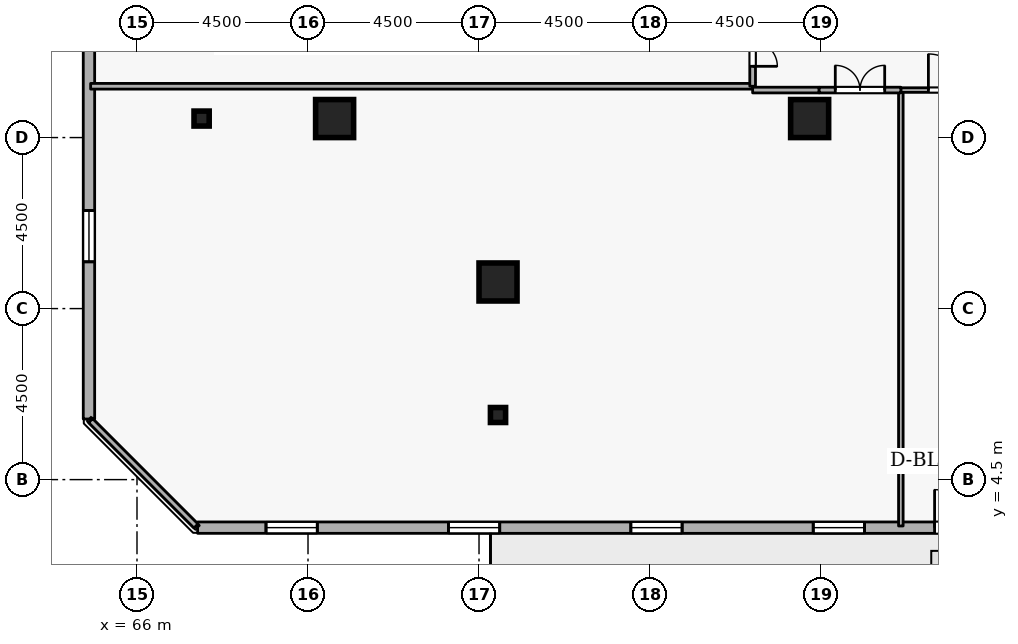
"""IFC4 building model, lengths in metres.
Left out: names, types, materials, properties, quantities, classifications, styles, units other than length and angle.
Written with IfcOpenShell. Run it as: python <this file> out.ifc"""

import sys

from ifc_helpers import new_model, si_unit, direction, frame, frame_2d, origin, origin_2d, place, context, subcontext, project, spatial, rectangle, i_section, extrude, element, fill, save


model = new_model("IFC4")
c1 = context("Model", 3, precision=1e-05, world=origin(), true_north=direction((0.0, 1.0)))
c2 = subcontext(c1, "Body", "Model", "MODEL_VIEW")
j1 = project(units=[si_unit("LENGTHUNIT", "METRE"), si_unit("PLANEANGLEUNIT", "RADIAN")], contexts=[c1])
p1 = place(None, origin())
s1 = spatial("IfcSite", under=j1, at=p1, CompositionType="ELEMENT")
p2 = place(p1, origin())
s2 = spatial("IfcBuilding", under=s1, at=p2, CompositionType="ELEMENT")
p3 = place(p2, frame((0.0, 0.0, 218.1)))
s3 = spatial("IfcBuildingStorey", under=s2, at=p3, CompositionType="ELEMENT", Elevation=218.1)
for number, where, z_axis, x_axis in (
    (1, (71.2, 14.0, 0.0), (0.0, 0.0, 1.0), (1.0, 0.0, 0.0)),
    (2, (75.5, 9.7, 0.0), (0.0, 0.0, 1.0), (1.0, 0.0, 0.0)),
    (3, (83.7, 14.0, 0.0), (0.0, 0.0, 1.0), (1.0, 0.0, 0.0)),
):
    element("IfcColumn", number, at=place(p3, frame(where, z_axis=z_axis, x_axis=x_axis)), inside=s3, PredefinedType="COLUMN", context=c2, shape_type="SweptSolid", body=[
        extrude(rectangle(XDim=1.0, YDim=1.0, at=origin_2d()), origin(), (0.0, 0.0, 1.0), 3.6),
    ])
for number, where, z_axis, x_axis in (
    (4, (67.7, 14.0, 0.0), (0.0, 0.0, 1.0), (1.0, 0.0, 0.0)),
    (5, (75.5, 6.2, 0.0), (0.0, 0.0, 1.0), (1.0, 0.0, 0.0)),
):
    element("IfcColumn", number, at=place(p3, frame(where, z_axis=z_axis, x_axis=x_axis)), inside=s3, PredefinedType="COLUMN", context=c2, shape_type="SweptSolid", body=[
        extrude(i_section(OverallWidth=0.399, OverallDepth=0.394, WebThickness=0.023, FlangeThickness=0.037, FilletRadius=0.015, at=origin_2d()), origin(), (0.0, 0.0, 1.0), 3.6),
    ])
p4 = place(p3, frame((67.594, 3.236, 0.0), z_axis=(0.0, 0.0, 1.0), x_axis=(0.999999999634, -2.7061402e-05, 0.0)))
e6 = element("IfcWall", 6, at=p4, inside=s3, PredefinedType="STANDARD", context=c2, shape_type="SweptSolid", body=[
    extrude(rectangle(XDim=36.087, YDim=0.3, at=frame_2d((18.043, 0.0))), origin(), (0.0, 0.0, 1.0), 2.66),
])
p5 = place(p4, frame((19.393, 0.0, 0.0)))
e7 = element("IfcOpeningElement", 7, at=p5, cuts=e6, PredefinedType="OPENING", context=c2, shape_type="SweptSolid", body=[
    extrude(rectangle(XDim=1.0, YDim=2.08, at=frame_2d((0.5, 1.04))), frame((0.0, 0.16, 0.0), z_axis=(0.0, -1.0, 0.0), x_axis=(1.0, 0.0, 0.0)), (0.0, 0.0, 1.0), 0.32),
])
p6 = place(p4, frame((1.8, 0.0, 0.72)))
e8 = element("IfcOpeningElement", 8, at=p6, cuts=e6, PredefinedType="OPENING", context=c2, shape_type="SweptSolid", body=[
    extrude(rectangle(XDim=1.35, YDim=1.05, at=frame_2d((0.675, 0.525))), frame((0.0, 0.16, 0.0), z_axis=(0.0, -1.0, 0.0), x_axis=(1.0, 0.0, 0.0)), (0.0, 0.0, 1.0), 0.32),
])
p7 = place(p4, frame((6.6, 0.0, 0.72)))
e9 = element("IfcOpeningElement", 9, at=p7, cuts=e6, PredefinedType="OPENING", context=c2, shape_type="SweptSolid", body=[
    extrude(rectangle(XDim=1.35, YDim=1.05, at=frame_2d((0.675, 0.525))), frame((0.0, 0.16, 0.0), z_axis=(0.0, -1.0, 0.0), x_axis=(1.0, 0.0, 0.0)), (0.0, 0.0, 1.0), 0.32),
])
p8 = place(p4, frame((11.4, 0.0, 0.72)))
e10 = element("IfcOpeningElement", 10, at=p8, cuts=e6, PredefinedType="OPENING", context=c2, shape_type="SweptSolid", body=[
    extrude(rectangle(XDim=1.35, YDim=1.05, at=frame_2d((0.675, 0.525))), frame((0.0, 0.16, 0.0), z_axis=(0.0, -1.0, 0.0), x_axis=(1.0, 0.0, 0.0)), (0.0, 0.0, 1.0), 0.32),
])
p9 = place(p4, frame((16.2, 0.0, 0.72)))
e11 = element("IfcOpeningElement", 11, at=p9, cuts=e6, PredefinedType="OPENING", context=c2, shape_type="SweptSolid", body=[
    extrude(rectangle(XDim=1.35, YDim=1.05, at=frame_2d((0.675, 0.525))), frame((0.0, 0.16, 0.0), z_axis=(0.0, -1.0, 0.0), x_axis=(1.0, 0.0, 0.0)), (0.0, 0.0, 1.0), 0.32),
])
p10 = place(p4, frame((25.8, 0.0, 0.72)))
e12 = element("IfcOpeningElement", 12, at=p10, cuts=e6, PredefinedType="OPENING", context=c2, shape_type="SweptSolid", body=[
    extrude(rectangle(XDim=1.35, YDim=1.05, at=frame_2d((0.675, 0.525))), frame((0.0, 0.16, 0.0), z_axis=(0.0, -1.0, 0.0), x_axis=(1.0, 0.0, 0.0)), (0.0, 0.0, 1.0), 0.32),
])
p11 = place(p4, frame((30.6, 0.0, 0.72)))
e13 = element("IfcOpeningElement", 13, at=p11, cuts=e6, PredefinedType="OPENING", context=c2, shape_type="SweptSolid", body=[
    extrude(rectangle(XDim=1.35, YDim=1.05, at=frame_2d((0.675, 0.525))), frame((0.0, 0.16, 0.0), z_axis=(0.0, -1.0, 0.0), x_axis=(1.0, 0.0, 0.0)), (0.0, 0.0, 1.0), 0.32),
])
p12 = place(p3, frame((64.735, 42.181, 0.0), z_axis=(0.0, 0.0, 1.0), x_axis=(2.7061402e-05, -0.999999999634, 0.0)))
e14 = element("IfcWall", 14, at=p12, inside=s3, PredefinedType="STANDARD", context=c2, shape_type="SweptSolid", body=[
    extrude(rectangle(XDim=36.087, YDim=0.3, at=frame_2d((18.043, 0.0))), origin(), (0.0, 0.0, 1.0), 2.66),
])
p13 = place(p12, frame((1.8, 0.0, 0.72)))
e15 = element("IfcOpeningElement", 15, at=p13, cuts=e14, PredefinedType="OPENING", context=c2, shape_type="SweptSolid", body=[
    extrude(rectangle(XDim=1.35, YDim=1.05, at=frame_2d((0.675, 0.525))), frame((0.0, 0.16, 0.0), z_axis=(0.0, -1.0, 0.0), x_axis=(1.0, 0.0, 0.0)), (0.0, 0.0, 1.0), 0.32),
])
p14 = place(p12, frame((6.6, 0.0, 0.72)))
e16 = element("IfcOpeningElement", 16, at=p14, cuts=e14, PredefinedType="OPENING", context=c2, shape_type="SweptSolid", body=[
    extrude(rectangle(XDim=1.35, YDim=1.05, at=frame_2d((0.675, 0.525))), frame((0.0, 0.16, 0.0), z_axis=(0.0, -1.0, 0.0), x_axis=(1.0, 0.0, 0.0)), (0.0, 0.0, 1.0), 0.32),
])
p15 = place(p12, frame((21.0, 0.0, 0.72)))
e17 = element("IfcOpeningElement", 17, at=p15, cuts=e14, PredefinedType="OPENING", context=c2, shape_type="SweptSolid", body=[
    extrude(rectangle(XDim=1.35, YDim=1.05, at=frame_2d((0.675, 0.525))), frame((0.0, 0.16, 0.0), z_axis=(0.0, -1.0, 0.0), x_axis=(1.0, 0.0, 0.0)), (0.0, 0.0, 1.0), 0.32),
])
p16 = place(p12, frame((30.6, 0.0, 0.72)))
e18 = element("IfcOpeningElement", 18, at=p16, cuts=e14, PredefinedType="OPENING", context=c2, shape_type="SweptSolid", body=[
    extrude(rectangle(XDim=1.35, YDim=1.05, at=frame_2d((0.675, 0.525))), frame((0.0, 0.16, 0.0), z_axis=(0.0, -1.0, 0.0), x_axis=(1.0, 0.0, 0.0)), (0.0, 0.0, 1.0), 0.32),
])
p17 = place(p3, frame((82.2, 14.85, 0.0), z_axis=(0.0, 0.0, 1.0), x_axis=(-1.0, 0.0, 0.0)))
e19 = element("IfcWall", 19, at=p17, inside=s3, PredefinedType="PARTITIONING", context=c2, shape_type="SweptSolid", body=[
    extrude(rectangle(XDim=17.42, YDim=0.15, at=frame_2d((8.71, 0.0))), origin(), (0.0, 0.0, 1.0), 3.26),
])
p18 = place(p3, frame((82.2, 17.2, 0.0), z_axis=(0.0, 0.0, 1.0), x_axis=(0.0, -1.0, 0.0)))
e20 = element("IfcWall", 20, at=p18, inside=s3, PredefinedType="PARTITIONING", context=c2, shape_type="SweptSolid", body=[
    extrude(rectangle(XDim=2.35, YDim=0.15, at=frame_2d((1.175, 0.0))), origin(), (0.0, 0.0, 1.0), 3.26),
])
p19 = place(p18, frame((0.525, 0.0, 0.0)))
e21 = element("IfcOpeningElement", 21, at=p19, cuts=e20, PredefinedType="OPENING", context=c2, shape_type="SweptSolid", body=[
    extrude(rectangle(XDim=1.3, YDim=2.12, at=frame_2d((0.65, 1.06))), frame((0.0, 0.085, 0.0), z_axis=(0.0, -1.0, 0.0), x_axis=(1.0, 0.0, 0.0)), (0.0, 0.0, 1.0), 0.17),
])
p20 = place(p3, frame((86.1, 3.28, 0.0), z_axis=(0.0, 0.0, 1.0), x_axis=(0.0, 1.0, 0.0)))
e22 = element("IfcWall", 22, at=p20, inside=s3, PredefinedType="PARTITIONING", context=c2, shape_type="SweptSolid", body=[
    extrude(rectangle(XDim=11.47, YDim=0.12, at=frame_2d((5.735, 0.0))), origin(), (0.0, 0.0, 1.0), 3.26),
])
p21 = place(p3, frame((86.1, 14.75, 0.0), z_axis=(0.0, 0.0, 1.0), x_axis=(1.0, 0.0, 0.0)))
e23 = element("IfcWall", 23, at=p21, inside=s3, PredefinedType="PARTITIONING", context=c2, shape_type="SweptSolid", body=[
    extrude(rectangle(XDim=2.4, YDim=0.12, at=frame_2d((1.2, 0.0))), origin(), (0.0, 0.0, 1.0), 3.26),
])
p22 = place(p21, frame((0.725, 0.0, 0.0)))
e24 = element("IfcOpeningElement", 24, at=p22, cuts=e23, PredefinedType="OPENING", context=c2, shape_type="SweptSolid", body=[
    extrude(rectangle(XDim=0.95, YDim=2.1, at=frame_2d((0.475, 1.05))), frame((0.0, 0.07, 0.0), z_axis=(0.0, -1.0, 0.0), x_axis=(1.0, 0.0, 0.0)), (0.0, 0.0, 1.0), 0.14),
])
p23 = place(p3, frame((67.552, 3.28, 0.0), z_axis=(0.0, 0.0, 1.0), x_axis=(-0.707106781187, 0.707106781187, 0.0)))
e25 = element("IfcWall", 25, at=p23, inside=s3, PredefinedType="PARTITIONING", context=c2, shape_type="SweptSolid", body=[
    extrude(rectangle(XDim=3.919, YDim=0.15, at=frame_2d((1.96, 0.0))), origin(), (0.0, 0.0, 1.0), 3.26),
])
p24 = place(p3, frame((82.2, 14.75, 0.0), z_axis=(0.0, 0.0, 1.0), x_axis=(1.0, 0.0, 0.0)))
e26 = element("IfcWall", 26, at=p24, inside=s3, PredefinedType="PARTITIONING", context=c2, shape_type="SweptSolid", body=[
    extrude(rectangle(XDim=1.75, YDim=0.15, at=frame_2d((0.875, 0.0))), origin(), (0.0, 0.0, 1.0), 3.26),
])
p25 = place(p3, frame((83.95, 14.75, 0.0), z_axis=(0.0, 0.0, 1.0), x_axis=(1.0, 0.0, 0.0)))
e27 = element("IfcWall", 27, at=p25, inside=s3, PredefinedType="PARTITIONING", context=c2, shape_type="SweptSolid", body=[
    extrude(rectangle(XDim=2.15, YDim=0.15, at=frame_2d((1.075, 0.0))), origin(), (0.0, 0.0, 1.0), 3.26),
])
p26 = place(p25, frame((0.425, 0.0, 0.0)))
e28 = element("IfcOpeningElement", 28, at=p26, cuts=e27, PredefinedType="OPENING", context=c2, shape_type="SweptSolid", body=[
    extrude(rectangle(XDim=1.3, YDim=2.12, at=frame_2d((0.65, 1.06))), frame((0.0, 0.085, 0.0), z_axis=(0.0, -1.0, 0.0), x_axis=(1.0, 0.0, 0.0)), (0.0, 0.0, 1.0), 0.17),
])
p27 = place(p5, origin())
e29 = element("IfcDoor", 29, at=p27, inside=s3, OperationType="SINGLE_SWING_LEFT", PredefinedType="DOOR", context=c2, shape_type="SweptSolid", body=[
    extrude(rectangle(XDim=1.0, YDim=2.08, at=frame_2d((0.5, 1.04))), frame((0.0, 0.025, 0.0), z_axis=(0.0, -1.0, 0.0), x_axis=(1.0, 0.0, 0.0)), (0.0, 0.0, 1.0), 0.05),
])
fill(e7, e29)
p28 = place(p6, origin())
e30 = element("IfcWindow", 30, at=p28, inside=s3, PartitioningType="SINGLE_PANEL", PredefinedType="WINDOW", context=c2, shape_type="SweptSolid", body=[
    extrude(rectangle(XDim=1.35, YDim=1.05, at=frame_2d((0.675, 0.525))), frame((0.0, 0.03, 0.0), z_axis=(0.0, -1.0, 0.0), x_axis=(1.0, 0.0, 0.0)), (0.0, 0.0, 1.0), 0.06),
])
fill(e8, e30)
p29 = place(p7, origin())
e31 = element("IfcWindow", 31, at=p29, inside=s3, PartitioningType="SINGLE_PANEL", PredefinedType="WINDOW", context=c2, shape_type="SweptSolid", body=[
    extrude(rectangle(XDim=1.35, YDim=1.05, at=frame_2d((0.675, 0.525))), frame((0.0, 0.03, 0.0), z_axis=(0.0, -1.0, 0.0), x_axis=(1.0, 0.0, 0.0)), (0.0, 0.0, 1.0), 0.06),
])
fill(e9, e31)
p30 = place(p8, origin())
e32 = element("IfcWindow", 32, at=p30, inside=s3, PartitioningType="SINGLE_PANEL", PredefinedType="WINDOW", context=c2, shape_type="SweptSolid", body=[
    extrude(rectangle(XDim=1.35, YDim=1.05, at=frame_2d((0.675, 0.525))), frame((0.0, 0.03, 0.0), z_axis=(0.0, -1.0, 0.0), x_axis=(1.0, 0.0, 0.0)), (0.0, 0.0, 1.0), 0.06),
])
fill(e10, e32)
p31 = place(p9, origin())
e33 = element("IfcWindow", 33, at=p31, inside=s3, PartitioningType="SINGLE_PANEL", PredefinedType="WINDOW", context=c2, shape_type="SweptSolid", body=[
    extrude(rectangle(XDim=1.35, YDim=1.05, at=frame_2d((0.675, 0.525))), frame((0.0, 0.03, 0.0), z_axis=(0.0, -1.0, 0.0), x_axis=(1.0, 0.0, 0.0)), (0.0, 0.0, 1.0), 0.06),
])
fill(e11, e33)
p32 = place(p16, origin())
e34 = element("IfcWindow", 34, at=p32, inside=s3, PartitioningType="SINGLE_PANEL", PredefinedType="WINDOW", context=c2, shape_type="SweptSolid", body=[
    extrude(rectangle(XDim=1.35, YDim=1.05, at=frame_2d((0.675, 0.525))), frame((0.0, 0.03, 0.0), z_axis=(0.0, -1.0, 0.0), x_axis=(1.0, 0.0, 0.0)), (0.0, 0.0, 1.0), 0.06),
])
fill(e18, e34)
p33 = place(p19, origin())
e35 = element("IfcDoor", 35, at=p33, inside=s3, OperationType="DOUBLE_DOOR_SINGLE_SWING", PredefinedType="DOOR", context=c2, shape_type="SweptSolid", body=[
    extrude(rectangle(XDim=1.3, YDim=2.12, at=frame_2d((0.65, 1.06))), frame((0.0, 0.025, 0.0), z_axis=(0.0, -1.0, 0.0), x_axis=(1.0, 0.0, 0.0)), (0.0, 0.0, 1.0), 0.05),
])
fill(e21, e35)
p34 = place(p22, origin())
e36 = element("IfcDoor", 36, at=p34, inside=s3, OperationType="SINGLE_SWING_LEFT", PredefinedType="DOOR", context=c2, shape_type="SweptSolid", body=[
    extrude(rectangle(XDim=0.95, YDim=2.1, at=frame_2d((0.475, 1.05))), frame((0.0, 0.025, 0.0), z_axis=(0.0, -1.0, 0.0), x_axis=(1.0, 0.0, 0.0)), (0.0, 0.0, 1.0), 0.05),
])
fill(e24, e36)
p35 = place(p26, origin())
e37 = element("IfcDoor", 37, at=p35, inside=s3, OperationType="DOUBLE_DOOR_SINGLE_SWING", PredefinedType="DOOR", context=c2, shape_type="SweptSolid", body=[
    extrude(rectangle(XDim=1.3, YDim=2.12, at=frame_2d((0.65, 1.06))), frame((0.0, 0.025, 0.0), z_axis=(0.0, -1.0, 0.0), x_axis=(1.0, 0.0, 0.0)), (0.0, 0.0, 1.0), 0.05),
])
fill(e28, e37)
save(model, sys.argv[1])
